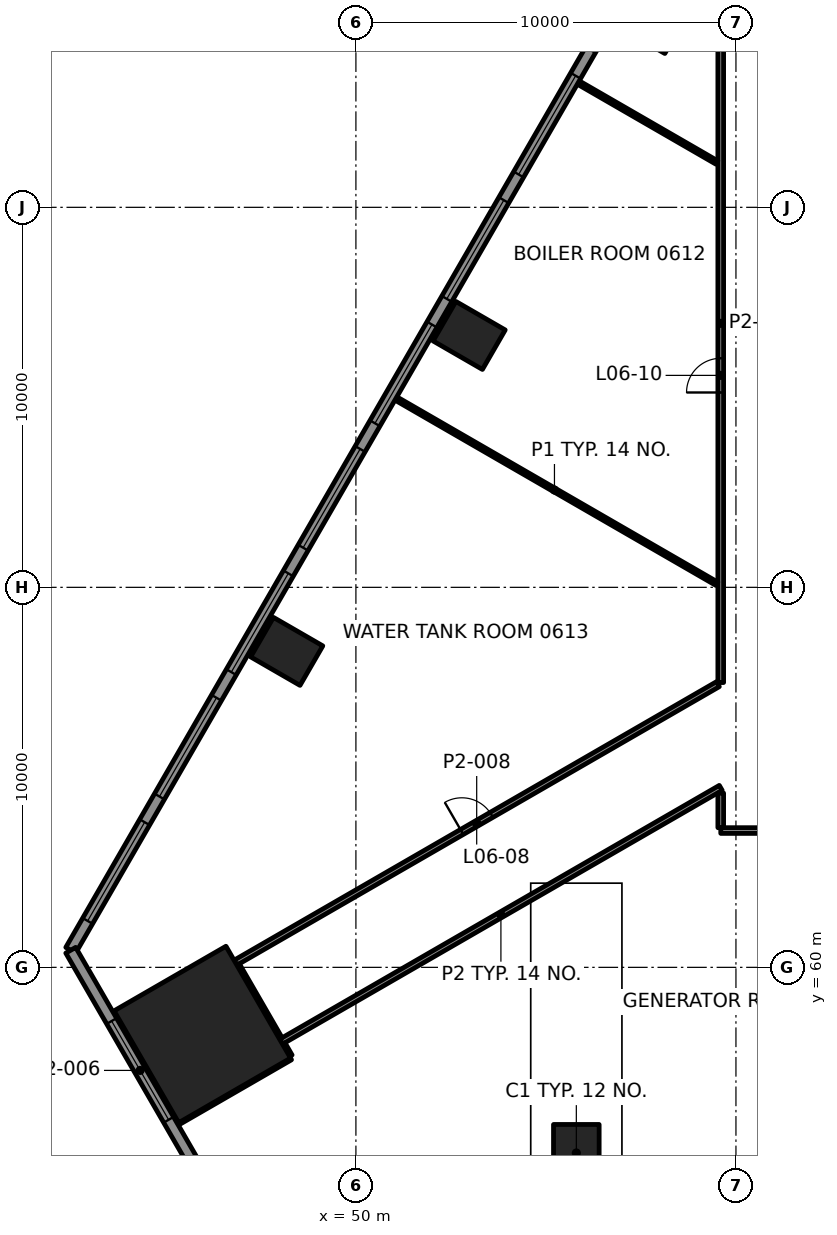
"""IFC4 building model, lengths in metres.
Left out: names, types, materials, properties, quantities, classifications, styles, units other than length and angle.
Written with IfcOpenShell. Run it as: python <this file> out.ifc"""

import sys

from ifc_helpers import new_model, si_unit, direction, frame, frame_2d, origin, origin_2d, place, context, subcontext, project, spatial, rectangle, extrude, element, fill, save


model = new_model("IFC4")
c1 = context("Model", 3, precision=1e-05, world=origin(), true_north=direction((0.0, 1.0)))
c2 = subcontext(c1, "Body", "Model", "MODEL_VIEW")
j1 = project(units=[si_unit("LENGTHUNIT", "METRE"), si_unit("PLANEANGLEUNIT", "RADIAN")], contexts=[c1])
p1 = place(None, origin())
s1 = spatial("IfcSite", under=j1, at=p1, CompositionType="ELEMENT")
p2 = place(p1, origin())
s2 = spatial("IfcBuilding", under=s1, at=p2, CompositionType="ELEMENT")
p3 = place(p2, frame((0.0, 0.0, 31.0)))
s3 = spatial("IfcBuildingStorey", under=s2, at=p3, CompositionType="ELEMENT", Elevation=31.0)
p4 = place(p3, frame((45.959, 58.233, 0.0), z_axis=(0.0, 0.0, 1.0), x_axis=(0.5, -0.866025403784, 0.0)))
e1 = element("IfcColumn", 1, at=p4, inside=s3, PredefinedType="COLUMN", context=c2, shape_type="SweptSolid", body=[
    extrude(rectangle(XDim=3.4, YDim=3.4, at=origin_2d()), origin(), (0.0, 0.0, 1.0), 4.5),
])
for number, where, z_axis, x_axis in (
    (2, (55.8, 55.115, -0.0), (0.0, 0.0, 1.0), (1.0, 0.0, 0.0)),
    (3, (57.78, 84.942, -0.0), (0.0, 0.0, 1.0), (-0.5, -0.866, 0.0)),
    (4, (52.979, 76.628, -0.0), (0.0, 0.0, 1.0), (-0.5, -0.866, 0.0)),
    (5, (48.179, 68.315, -0.0), (0.0, 0.0, 1.0), (-0.5, -0.866, 0.0)),
):
    element("IfcColumn", number, at=place(p3, frame(where, z_axis=z_axis, x_axis=x_axis)), inside=s3, PredefinedType="COLUMN", context=c2, shape_type="SweptSolid", body=[
        extrude(rectangle(XDim=1.2, YDim=1.5, at=origin_2d()), origin(), (0.0, 0.0, 1.0), 4.5),
    ])
p5 = place(p3, frame((90.4, 63.6, 0.0), z_axis=(0.0, 0.0, 1.0), x_axis=(-1.0, 0.0, 0.0)))
e6 = element("IfcWall", 6, at=p5, inside=s3, PredefinedType="PARTITIONING", context=c2, shape_type="SweptSolid", body=[
    extrude(rectangle(XDim=30.799, YDim=0.15, at=frame_2d((15.4, 0.0))), origin(), (0.0, 0.0, 1.0), 3.45),
])
p6 = place(p5, frame((6.001, 0.0, 0.0)))
e7 = element("IfcOpeningElement", 7, at=p6, cuts=e6, PredefinedType="OPENING", context=c2, shape_type="SweptSolid", body=[
    extrude(rectangle(XDim=1.2, YDim=2.1, at=frame_2d((0.6, 1.05))), frame((0.0, 0.085, 0.0), z_axis=(0.0, -1.0, 0.0), x_axis=(1.0, 0.0, 0.0)), (0.0, 0.0, 1.0), 0.17),
])
p7 = place(p5, frame((18.55, 0.0, 0.0)))
e8 = element("IfcOpeningElement", 8, at=p7, cuts=e6, PredefinedType="OPENING", context=c2, shape_type="SweptSolid", body=[
    extrude(rectangle(XDim=0.9, YDim=2.1, at=frame_2d((0.45, 1.05))), frame((0.0, 0.085, 0.0), z_axis=(0.0, -1.0, 0.0), x_axis=(1.0, 0.0, 0.0)), (0.0, 0.0, 1.0), 0.17),
])
p8 = place(p5, frame((27.198, 0.0, 0.0)))
e9 = element("IfcOpeningElement", 9, at=p8, cuts=e6, PredefinedType="OPENING", context=c2, shape_type="SweptSolid", body=[
    extrude(rectangle(XDim=1.2, YDim=2.1, at=frame_2d((0.6, 1.05))), frame((0.0, 0.085, 0.0), z_axis=(0.0, -1.0, 0.0), x_axis=(1.0, 0.0, 0.0)), (0.0, 0.0, 1.0), 0.17),
])
p9 = place(p3, frame((45.198, 55.831, 0.0), z_axis=(0.0, 0.0, 1.0), x_axis=(0.866014251095, 0.500019316528, 0.0)))
e10 = element("IfcWall", 10, at=p9, inside=s3, PredefinedType="PARTITIONING", context=c2, shape_type="SweptSolid", body=[
    extrude(rectangle(XDim=3.559, YDim=0.1, at=frame_2d((1.78, 0.0))), origin(), (0.0, 0.0, 1.0), 3.45),
])
p10 = place(p3, frame((48.031, 58.044, 0.0), z_axis=(0.0, 0.0, 1.0), x_axis=(0.866027935033, 0.499995615723, 0.0)))
e11 = element("IfcWall", 11, at=p10, inside=s3, PredefinedType="PARTITIONING", context=c2, shape_type="SweptSolid", body=[
    extrude(rectangle(XDim=13.358, YDim=0.15, at=frame_2d((6.679, 0.0))), origin(), (0.0, 0.0, 1.0), 3.297),
])
p11 = place(p3, frame((46.832, 60.123, 0.0), z_axis=(0.0, 0.0, 1.0), x_axis=(0.866022484069, 0.500005057062, 0.0)))
e12 = element("IfcWall", 12, at=p11, inside=s3, PredefinedType="PARTITIONING", context=c2, shape_type="SweptSolid", body=[
    extrude(rectangle(XDim=14.657, YDim=0.15, at=frame_2d((7.329, 0.0))), origin(), (0.0, 0.0, 1.0), 3.45),
])
p12 = place(p11, frame((6.879, 0.0, 0.0)))
e13 = element("IfcOpeningElement", 13, at=p12, cuts=e12, PredefinedType="OPENING", context=c2, shape_type="SweptSolid", body=[
    extrude(rectangle(XDim=0.9, YDim=2.1, at=frame_2d((0.45, 1.05))), frame((0.0, 0.085, 0.0), z_axis=(0.0, -1.0, 0.0), x_axis=(1.0, 0.0, 0.0)), (0.0, 0.0, 1.0), 0.17),
])
p13 = place(p3, frame((59.6, 63.676, 0.0), z_axis=(0.0, 0.0, 1.0), x_axis=(0.0, 1.0, 0.0)))
e14 = element("IfcWall", 14, at=p13, inside=s3, PredefinedType="PARTITIONING", context=c2, shape_type="SweptSolid", body=[
    extrude(rectangle(XDim=0.911, YDim=0.15, at=frame_2d((0.456, 0.0))), origin(), (0.0, 0.0, 1.0), 3.45),
])
p14 = place(p3, frame((59.6, 67.494, 0.0), z_axis=(0.0, 0.0, 1.0), x_axis=(0.0, 1.0, 0.0)))
e15 = element("IfcWall", 15, at=p14, inside=s3, PredefinedType="PARTITIONING", context=c2, shape_type="SweptSolid", body=[
    extrude(rectangle(XDim=18.905, YDim=0.15, at=frame_2d((9.453, 0.0))), origin(), (0.0, 0.0, 1.0), 3.45),
])
p15 = place(p14, frame((7.633, 0.0, 0.0)))
e16 = element("IfcOpeningElement", 16, at=p15, cuts=e15, PredefinedType="OPENING", context=c2, shape_type="SweptSolid", body=[
    extrude(rectangle(XDim=0.9, YDim=2.1, at=frame_2d((0.45, 1.05))), frame((0.0, 0.085, 0.0), z_axis=(0.0, -1.0, 0.0), x_axis=(1.0, 0.0, 0.0)), (0.0, 0.0, 1.0), 0.17),
])
p16 = place(p3, frame((48.256, 57.655, 0.0), z_axis=(0.0, 0.0, 1.0), x_axis=(-0.499854089722, 0.866109628736, 0.0)))
e17 = element("IfcWall", 17, at=p16, inside=s3, PredefinedType="PARTITIONING", context=c2, shape_type="SweptSolid", body=[
    extrude(rectangle(XDim=0.375, YDim=0.15, at=frame_2d((0.187, 0.0))), origin(), (0.0, 0.0, 1.0), 3.45),
])
p17 = place(p3, frame((59.499, 81.178, 0.0), z_axis=(0.0, 0.0, 1.0), x_axis=(-0.866009972995, 0.500026725959, 0.0)))
e18 = element("IfcWall", 18, at=p17, inside=s3, PredefinedType="PARTITIONING", context=c2, shape_type="SweptSolid", body=[
    extrude(rectangle(XDim=4.329, YDim=0.1, at=frame_2d((2.165, 0.0))), origin(), (0.0, 0.0, 1.0), 3.215),
])
p18 = place(p3, frame((59.499, 70.093, 0.0), z_axis=(0.0, 0.0, 1.0), x_axis=(-0.866032382951, 0.499987911535, 0.0)))
e19 = element("IfcWall", 19, at=p18, inside=s3, PredefinedType="PARTITIONING", context=c2, shape_type="SweptSolid", body=[
    extrude(rectangle(XDim=9.872, YDim=0.1, at=frame_2d((4.936, 0.0))), origin(), (0.0, 0.0, 1.0), 3.215),
])
p19 = place(p3, frame((47.993, 58.109, 0.0), z_axis=(0.0, 0.0, 1.0), x_axis=(-0.499944821793, 0.866057258594, 0.0)))
e20 = element("IfcWall", 20, at=p19, inside=s3, PredefinedType="PARTITIONING", context=c2, shape_type="SweptSolid", body=[
    extrude(rectangle(XDim=2.249, YDim=0.15, at=frame_2d((1.125, 0.0))), origin(), (0.0, 0.0, 1.0), 3.297),
])
p20 = place(p3, frame((71.348, 110.424, 0.0), z_axis=(0.0, 0.0, 1.0), x_axis=(-0.500000550228, -0.86602508611, 0.0)))
e21 = element("IfcWall", 21, at=p20, inside=s3, PredefinedType="SOLIDWALL", context=c2, shape_type="SweptSolid", body=[
    extrude(rectangle(XDim=57.704, YDim=0.3, at=frame_2d((28.852, 0.0))), origin(), (0.0, 0.0, 1.0), 4.05),
])
p21 = place(p20, frame((0.89, 0.0, 0.8)))
e22 = element("IfcOpeningElement", 22, at=p21, cuts=e21, PredefinedType="OPENING", context=c2, shape_type="SweptSolid", body=[
    extrude(rectangle(XDim=3.0, YDim=2.4, at=frame_2d((1.5, 1.2))), frame((0.0, 0.16, 0.0), z_axis=(0.0, -1.0, 0.0), x_axis=(1.0, 0.0, 0.0)), (0.0, 0.0, 1.0), 0.32),
])
p22 = place(p20, frame((4.67, 0.0, 0.8)))
e23 = element("IfcOpeningElement", 23, at=p22, cuts=e21, PredefinedType="OPENING", context=c2, shape_type="SweptSolid", body=[
    extrude(rectangle(XDim=3.0, YDim=2.4, at=frame_2d((1.5, 1.2))), frame((0.0, 0.16, 0.0), z_axis=(0.0, -1.0, 0.0), x_axis=(1.0, 0.0, 0.0)), (0.0, 0.0, 1.0), 0.32),
])
p23 = place(p20, frame((8.451, 0.0, 0.8)))
e24 = element("IfcOpeningElement", 24, at=p23, cuts=e21, PredefinedType="OPENING", context=c2, shape_type="SweptSolid", body=[
    extrude(rectangle(XDim=3.0, YDim=2.4, at=frame_2d((1.5, 1.2))), frame((0.0, 0.16, 0.0), z_axis=(0.0, -1.0, 0.0), x_axis=(1.0, 0.0, 0.0)), (0.0, 0.0, 1.0), 0.32),
])
p24 = place(p20, frame((12.231, 0.0, 0.8)))
e25 = element("IfcOpeningElement", 25, at=p24, cuts=e21, PredefinedType="OPENING", context=c2, shape_type="SweptSolid", body=[
    extrude(rectangle(XDim=3.0, YDim=2.4, at=frame_2d((1.5, 1.2))), frame((0.0, 0.16, 0.0), z_axis=(0.0, -1.0, 0.0), x_axis=(1.0, 0.0, 0.0)), (0.0, 0.0, 1.0), 0.32),
])
p25 = place(p20, frame((16.011, 0.0, 0.8)))
e26 = element("IfcOpeningElement", 26, at=p25, cuts=e21, PredefinedType="OPENING", context=c2, shape_type="SweptSolid", body=[
    extrude(rectangle(XDim=3.0, YDim=2.4, at=frame_2d((1.5, 1.2))), frame((0.0, 0.16, 0.0), z_axis=(0.0, -1.0, 0.0), x_axis=(1.0, 0.0, 0.0)), (0.0, 0.0, 1.0), 0.32),
])
p26 = place(p20, frame((19.792, 0.0, 0.8)))
e27 = element("IfcOpeningElement", 27, at=p26, cuts=e21, PredefinedType="OPENING", context=c2, shape_type="SweptSolid", body=[
    extrude(rectangle(XDim=3.0, YDim=2.4, at=frame_2d((1.5, 1.2))), frame((0.0, 0.16, 0.0), z_axis=(0.0, -1.0, 0.0), x_axis=(1.0, 0.0, 0.0)), (0.0, 0.0, 1.0), 0.32),
])
p27 = place(p20, frame((23.572, 0.0, 0.8)))
e28 = element("IfcOpeningElement", 28, at=p27, cuts=e21, PredefinedType="OPENING", context=c2, shape_type="SweptSolid", body=[
    extrude(rectangle(XDim=3.0, YDim=2.4, at=frame_2d((1.5, 1.2))), frame((0.0, 0.16, 0.0), z_axis=(0.0, -1.0, 0.0), x_axis=(1.0, 0.0, 0.0)), (0.0, 0.0, 1.0), 0.32),
])
p28 = place(p20, frame((27.352, 0.0, 0.8)))
e29 = element("IfcOpeningElement", 29, at=p28, cuts=e21, PredefinedType="OPENING", context=c2, shape_type="SweptSolid", body=[
    extrude(rectangle(XDim=3.0, YDim=2.4, at=frame_2d((1.5, 1.2))), frame((0.0, 0.16, 0.0), z_axis=(0.0, -1.0, 0.0), x_axis=(1.0, 0.0, 0.0)), (0.0, 0.0, 1.0), 0.32),
])
p29 = place(p20, frame((31.132, 0.0, 0.8)))
e30 = element("IfcOpeningElement", 30, at=p29, cuts=e21, PredefinedType="OPENING", context=c2, shape_type="SweptSolid", body=[
    extrude(rectangle(XDim=3.0, YDim=2.4, at=frame_2d((1.5, 1.2))), frame((0.0, 0.16, 0.0), z_axis=(0.0, -1.0, 0.0), x_axis=(1.0, 0.0, 0.0)), (0.0, 0.0, 1.0), 0.32),
])
p30 = place(p20, frame((34.913, 0.0, 0.8)))
e31 = element("IfcOpeningElement", 31, at=p30, cuts=e21, PredefinedType="OPENING", context=c2, shape_type="SweptSolid", body=[
    extrude(rectangle(XDim=3.0, YDim=2.4, at=frame_2d((1.5, 1.2))), frame((0.0, 0.16, 0.0), z_axis=(0.0, -1.0, 0.0), x_axis=(1.0, 0.0, 0.0)), (0.0, 0.0, 1.0), 0.32),
])
p31 = place(p20, frame((38.693, 0.0, 0.8)))
e32 = element("IfcOpeningElement", 32, at=p31, cuts=e21, PredefinedType="OPENING", context=c2, shape_type="SweptSolid", body=[
    extrude(rectangle(XDim=3.0, YDim=2.4, at=frame_2d((1.5, 1.2))), frame((0.0, 0.16, 0.0), z_axis=(0.0, -1.0, 0.0), x_axis=(1.0, 0.0, 0.0)), (0.0, 0.0, 1.0), 0.32),
])
p32 = place(p20, frame((42.473, 0.0, 0.8)))
e33 = element("IfcOpeningElement", 33, at=p32, cuts=e21, PredefinedType="OPENING", context=c2, shape_type="SweptSolid", body=[
    extrude(rectangle(XDim=3.0, YDim=2.4, at=frame_2d((1.5, 1.2))), frame((0.0, 0.16, 0.0), z_axis=(0.0, -1.0, 0.0), x_axis=(1.0, 0.0, 0.0)), (0.0, 0.0, 1.0), 0.32),
])
p33 = place(p20, frame((46.253, 0.0, 0.8)))
e34 = element("IfcOpeningElement", 34, at=p33, cuts=e21, PredefinedType="OPENING", context=c2, shape_type="SweptSolid", body=[
    extrude(rectangle(XDim=3.0, YDim=2.4, at=frame_2d((1.5, 1.2))), frame((0.0, 0.16, 0.0), z_axis=(0.0, -1.0, 0.0), x_axis=(1.0, 0.0, 0.0)), (0.0, 0.0, 1.0), 0.32),
])
p34 = place(p20, frame((50.033, 0.0, 0.8)))
e35 = element("IfcOpeningElement", 35, at=p34, cuts=e21, PredefinedType="OPENING", context=c2, shape_type="SweptSolid", body=[
    extrude(rectangle(XDim=3.0, YDim=2.4, at=frame_2d((1.5, 1.2))), frame((0.0, 0.16, 0.0), z_axis=(0.0, -1.0, 0.0), x_axis=(1.0, 0.0, 0.0)), (0.0, 0.0, 1.0), 0.32),
])
p35 = place(p20, frame((53.814, 0.0, 0.8)))
e36 = element("IfcOpeningElement", 36, at=p35, cuts=e21, PredefinedType="OPENING", context=c2, shape_type="SweptSolid", body=[
    extrude(rectangle(XDim=3.0, YDim=2.4, at=frame_2d((1.5, 1.2))), frame((0.0, 0.16, 0.0), z_axis=(0.0, -1.0, 0.0), x_axis=(1.0, 0.0, 0.0)), (0.0, 0.0, 1.0), 0.32),
])
p36 = place(p3, frame((42.496, 60.451, 0.0), z_axis=(0.0, 0.0, 1.0), x_axis=(0.500000231294, -0.866025270247, 0.0)))
e37 = element("IfcWall", 37, at=p36, inside=s3, PredefinedType="SOLIDWALL", context=c2, shape_type="SweptSolid", body=[
    extrude(rectangle(XDim=7.304, YDim=0.3, at=frame_2d((3.652, 0.0))), origin(), (0.0, 0.0, 1.0), 4.05),
])
p37 = place(p36, frame((2.152, 0.0, 0.8)))
e38 = element("IfcOpeningElement", 38, at=p37, cuts=e37, PredefinedType="OPENING", context=c2, shape_type="SweptSolid", body=[
    extrude(rectangle(XDim=3.0, YDim=2.4, at=frame_2d((1.5, 1.2))), frame((0.0, 0.16, 0.0), z_axis=(0.0, -1.0, 0.0), x_axis=(1.0, 0.0, 0.0)), (0.0, 0.0, 1.0), 0.32),
])
p38 = place(p12, origin())
e39 = element("IfcDoor", 39, at=p38, inside=s3, OperationType="SINGLE_SWING_RIGHT", PredefinedType="DOOR", context=c2, shape_type="SweptSolid", body=[
    extrude(rectangle(XDim=0.9, YDim=2.1, at=frame_2d((0.45, 1.05))), frame((0.0, 0.025, 0.0), z_axis=(0.0, -1.0, 0.0), x_axis=(1.0, 0.0, 0.0)), (0.0, 0.0, 1.0), 0.05),
])
fill(e13, e39)
p39 = place(p15, origin())
e40 = element("IfcDoor", 40, at=p39, inside=s3, OperationType="SINGLE_SWING_LEFT", PredefinedType="DOOR", context=c2, shape_type="SweptSolid", body=[
    extrude(rectangle(XDim=0.9, YDim=2.1, at=frame_2d((0.45, 1.05))), frame((0.0, 0.025, 0.0), z_axis=(0.0, -1.0, 0.0), x_axis=(1.0, 0.0, 0.0)), (0.0, 0.0, 1.0), 0.05),
])
fill(e16, e40)
p40 = place(p29, origin())
e41 = element("IfcWindow", 41, at=p40, inside=s3, PartitioningType="SINGLE_PANEL", PredefinedType="WINDOW", context=c2, shape_type="SweptSolid", body=[
    extrude(rectangle(XDim=3.0, YDim=2.4, at=frame_2d((1.5, 1.2))), frame((0.0, 0.03, 0.0), z_axis=(0.0, -1.0, 0.0), x_axis=(1.0, 0.0, 0.0)), (0.0, 0.0, 1.0), 0.06),
])
fill(e30, e41)
p41 = place(p30, origin())
e42 = element("IfcWindow", 42, at=p41, inside=s3, PartitioningType="SINGLE_PANEL", PredefinedType="WINDOW", context=c2, shape_type="SweptSolid", body=[
    extrude(rectangle(XDim=3.0, YDim=2.4, at=frame_2d((1.5, 1.2))), frame((0.0, 0.03, 0.0), z_axis=(0.0, -1.0, 0.0), x_axis=(1.0, 0.0, 0.0)), (0.0, 0.0, 1.0), 0.06),
])
fill(e31, e42)
p42 = place(p31, origin())
e43 = element("IfcWindow", 43, at=p42, inside=s3, PartitioningType="SINGLE_PANEL", PredefinedType="WINDOW", context=c2, shape_type="SweptSolid", body=[
    extrude(rectangle(XDim=3.0, YDim=2.4, at=frame_2d((1.5, 1.2))), frame((0.0, 0.03, 0.0), z_axis=(0.0, -1.0, 0.0), x_axis=(1.0, 0.0, 0.0)), (0.0, 0.0, 1.0), 0.06),
])
fill(e32, e43)
p43 = place(p32, origin())
e44 = element("IfcWindow", 44, at=p43, inside=s3, PartitioningType="SINGLE_PANEL", PredefinedType="WINDOW", context=c2, shape_type="SweptSolid", body=[
    extrude(rectangle(XDim=3.0, YDim=2.4, at=frame_2d((1.5, 1.2))), frame((0.0, 0.03, 0.0), z_axis=(0.0, -1.0, 0.0), x_axis=(1.0, 0.0, 0.0)), (0.0, 0.0, 1.0), 0.06),
])
fill(e33, e44)
p44 = place(p33, origin())
e45 = element("IfcWindow", 45, at=p44, inside=s3, PartitioningType="SINGLE_PANEL", PredefinedType="WINDOW", context=c2, shape_type="SweptSolid", body=[
    extrude(rectangle(XDim=3.0, YDim=2.4, at=frame_2d((1.5, 1.2))), frame((0.0, 0.03, 0.0), z_axis=(0.0, -1.0, 0.0), x_axis=(1.0, 0.0, 0.0)), (0.0, 0.0, 1.0), 0.06),
])
fill(e34, e45)
p45 = place(p34, origin())
e46 = element("IfcWindow", 46, at=p45, inside=s3, PartitioningType="SINGLE_PANEL", PredefinedType="WINDOW", context=c2, shape_type="SweptSolid", body=[
    extrude(rectangle(XDim=3.0, YDim=2.4, at=frame_2d((1.5, 1.2))), frame((0.0, 0.03, 0.0), z_axis=(0.0, -1.0, 0.0), x_axis=(1.0, 0.0, 0.0)), (0.0, 0.0, 1.0), 0.06),
])
fill(e35, e46)
p46 = place(p35, origin())
e47 = element("IfcWindow", 47, at=p46, inside=s3, PartitioningType="SINGLE_PANEL", PredefinedType="WINDOW", context=c2, shape_type="SweptSolid", body=[
    extrude(rectangle(XDim=3.0, YDim=2.4, at=frame_2d((1.5, 1.2))), frame((0.0, 0.03, 0.0), z_axis=(0.0, -1.0, 0.0), x_axis=(1.0, 0.0, 0.0)), (0.0, 0.0, 1.0), 0.06),
])
fill(e36, e47)
p47 = place(p37, origin())
e48 = element("IfcWindow", 48, at=p47, inside=s3, PartitioningType="SINGLE_PANEL", PredefinedType="WINDOW", context=c2, shape_type="SweptSolid", body=[
    extrude(rectangle(XDim=3.0, YDim=2.4, at=frame_2d((1.5, 1.2))), frame((0.0, 0.03, 0.0), z_axis=(0.0, -1.0, 0.0), x_axis=(1.0, 0.0, 0.0)), (0.0, 0.0, 1.0), 0.06),
])
fill(e38, e48)
save(model, sys.argv[1])
